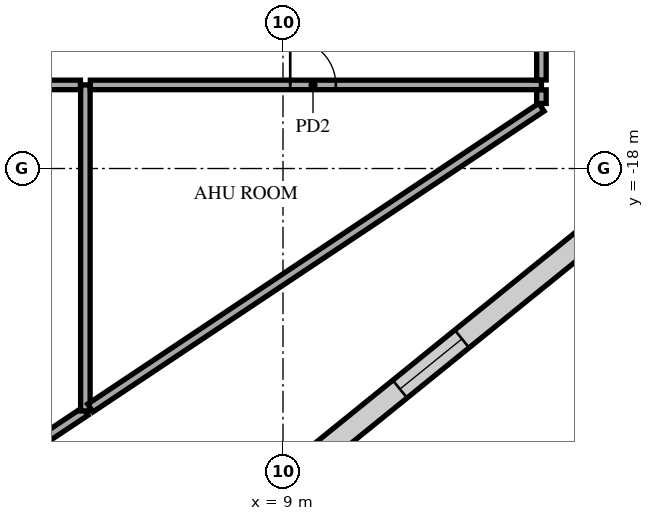
"""IFC4 building model, lengths in metres.
Left out: names, types, materials, properties, quantities, classifications, styles, units other than length and angle.
Written with IfcOpenShell. Run it as: python <this file> out.ifc"""

import sys

from ifc_helpers import new_model, si_unit, direction, frame, frame_2d, origin, place, context, subcontext, project, spatial, rectangle, extrude, element, fill, save


model = new_model("IFC4")
c1 = context("Model", 3, precision=1e-05, world=origin(), true_north=direction((0.0, 1.0)))
c2 = subcontext(c1, "Body", "Model", "MODEL_VIEW")
j1 = project(units=[si_unit("LENGTHUNIT", "METRE"), si_unit("PLANEANGLEUNIT", "RADIAN")], contexts=[c1])
p1 = place(None, origin())
s1 = spatial("IfcSite", under=j1, at=p1, CompositionType="ELEMENT")
p2 = place(p1, origin())
s2 = spatial("IfcBuilding", under=s1, at=p2, CompositionType="ELEMENT")
p3 = place(p2, frame((0.0, 0.0, 183.7)))
s3 = spatial("IfcBuildingStorey", under=s2, at=p3, CompositionType="ELEMENT", Elevation=183.7)
p4 = place(p3, frame((1.196, -26.125, 0.0), z_axis=(0.0, 0.0, 1.0), x_axis=(0.832014296467, 0.554754189236, 0.0)))
e1 = element("IfcWall", 1, at=p4, inside=s3, PredefinedType="PARTITIONING", context=c2, shape_type="SweptSolid", body=[
    extrude(rectangle(XDim=3.13, YDim=0.25, at=frame_2d((1.565, 0.0))), origin(), (0.0, 0.0, 1.0), 4.65),
])
p5 = place(p3, frame((3.8, -24.38, 0.0), z_axis=(0.0, 0.0, 1.0), x_axis=(0.0, 1.0, 0.0)))
e2 = element("IfcWall", 2, at=p5, inside=s3, PredefinedType="PARTITIONING", context=c2, shape_type="SweptSolid", body=[
    extrude(rectangle(XDim=8.58, YDim=0.25, at=frame_2d((4.29, 0.0))), origin(), (0.0, 0.0, 1.0), 5.22),
])
p6 = place(p3, frame((3.93, -24.302, 0.0), z_axis=(0.0, 0.0, 1.0), x_axis=(0.832021333185, 0.554743635497, 0.0)))
e3 = element("IfcWall", 3, at=p6, inside=s3, PredefinedType="PARTITIONING", context=c2, shape_type="SweptSolid", body=[
    extrude(rectangle(XDim=14.267, YDim=0.25, at=frame_2d((7.133, 0.0))), origin(), (0.0, 0.0, 1.0), 4.386),
])
p7 = place(p3, frame((-5.07, -15.8, 0.0), z_axis=(0.0, 0.0, 1.0), x_axis=(1.0, 0.0, 0.0)))
e4 = element("IfcWall", 4, at=p7, inside=s3, PredefinedType="PARTITIONING", context=c2, shape_type="SweptSolid", body=[
    extrude(rectangle(XDim=8.74, YDim=0.25, at=frame_2d((4.37, 0.0))), origin(), (0.0, 0.0, 1.0), 4.65),
])
p8 = place(p7, frame((3.77, 0.0, 0.0)))
e5 = element("IfcOpeningElement", 5, at=p8, cuts=e4, PredefinedType="OPENING", context=c2, shape_type="SweptSolid", body=[
    extrude(rectangle(XDim=1.2, YDim=2.1, at=frame_2d((0.6, 1.05))), frame((0.0, 0.135, 0.0), z_axis=(0.0, -1.0, 0.0), x_axis=(1.0, 0.0, 0.0)), (0.0, 0.0, 1.0), 0.27),
])
p9 = place(p3, frame((3.93, -15.8, 0.0), z_axis=(0.0, 0.0, 1.0), x_axis=(1.0, 0.0, 0.0)))
e6 = element("IfcWall", 6, at=p9, inside=s3, PredefinedType="PARTITIONING", context=c2, shape_type="SweptSolid", body=[
    extrude(rectangle(XDim=11.87, YDim=0.25, at=frame_2d((5.935, 0.0))), origin(), (0.0, 0.0, 1.0), 4.65),
])
p10 = place(p9, frame((5.26, 0.0, 0.0)))
e7 = element("IfcOpeningElement", 7, at=p10, cuts=e6, PredefinedType="OPENING", context=c2, shape_type="SweptSolid", body=[
    extrude(rectangle(XDim=1.2, YDim=2.1, at=frame_2d((0.6, 1.05))), frame((0.0, 0.135, 0.0), z_axis=(0.0, -1.0, 0.0), x_axis=(1.0, 0.0, 0.0)), (0.0, 0.0, 1.0), 0.27),
])
p11 = place(p3, frame((15.8, -16.289, 0.0), z_axis=(0.0, 0.0, 1.0), x_axis=(0.0, 1.0, 0.0)))
e8 = element("IfcWall", 8, at=p11, inside=s3, PredefinedType="PARTITIONING", context=c2, shape_type="SweptSolid", body=[
    extrude(rectangle(XDim=0.359, YDim=0.25, at=frame_2d((0.179, 0.0))), origin(), (0.0, 0.0, 1.0), 4.386),
])
p12 = place(p3, frame((15.8, -15.67, 0.0), z_axis=(0.0, 0.0, 1.0), x_axis=(0.0, 1.0, 0.0)))
e9 = element("IfcWall", 9, at=p12, inside=s3, PredefinedType="PARTITIONING", context=c2, shape_type="SweptSolid", body=[
    extrude(rectangle(XDim=1.97, YDim=0.25, at=frame_2d((0.985, 0.0))), origin(), (0.0, 0.0, 1.0), 4.65),
])
p13 = place(p3, frame((-2.907, -35.938, 0.0), z_axis=(0.0, 0.0, 1.0), x_axis=(0.777145668104, 0.629320753311, 0.0)))
e10 = element("IfcWall", 10, at=p13, inside=s3, PredefinedType="STANDARD", context=c2, shape_type="SweptSolid", body=[
    extrude(rectangle(XDim=49.751, YDim=0.6, at=frame_2d((24.876, 0.0))), origin(), (0.0, 0.0, 1.0), 5.22),
])
p14 = place(p13, frame((1.161, 0.0, 0.6)))
e11 = element("IfcOpeningElement", 11, at=p14, cuts=e10, PredefinedType="OPENING", context=c2, shape_type="SweptSolid", body=[
    extrude(rectangle(XDim=2.1, YDim=4.17, at=frame_2d((1.05, 2.085))), frame((0.0, 0.31, 0.0), z_axis=(0.0, -1.0, 0.0), x_axis=(1.0, 0.0, 0.0)), (0.0, 0.0, 1.0), 0.62),
])
p15 = place(p13, frame((5.644, 0.0, 0.6)))
e12 = element("IfcOpeningElement", 12, at=p15, cuts=e10, PredefinedType="OPENING", context=c2, shape_type="SweptSolid", body=[
    extrude(rectangle(XDim=2.1, YDim=4.17, at=frame_2d((1.05, 2.085))), frame((0.0, 0.31, 0.0), z_axis=(0.0, -1.0, 0.0), x_axis=(1.0, 0.0, 0.0)), (0.0, 0.0, 1.0), 0.62),
])
p16 = place(p13, frame((10.189, 0.0, 0.6)))
e13 = element("IfcOpeningElement", 13, at=p16, cuts=e10, PredefinedType="OPENING", context=c2, shape_type="SweptSolid", body=[
    extrude(rectangle(XDim=2.1, YDim=4.17, at=frame_2d((1.05, 2.085))), frame((0.0, 0.31, 0.0), z_axis=(0.0, -1.0, 0.0), x_axis=(1.0, 0.0, 0.0)), (0.0, 0.0, 1.0), 0.62),
])
p17 = place(p13, frame((19.28, 0.0, 0.6)))
e14 = element("IfcOpeningElement", 14, at=p17, cuts=e10, PredefinedType="OPENING", context=c2, shape_type="SweptSolid", body=[
    extrude(rectangle(XDim=2.1, YDim=4.17, at=frame_2d((1.05, 2.085))), frame((0.0, 0.31, 0.0), z_axis=(0.0, -1.0, 0.0), x_axis=(1.0, 0.0, 0.0)), (0.0, 0.0, 1.0), 0.62),
])
p18 = place(p13, frame((42.008, 0.0, 0.6)))
e15 = element("IfcOpeningElement", 15, at=p18, cuts=e10, PredefinedType="OPENING", context=c2, shape_type="SweptSolid", body=[
    extrude(rectangle(XDim=2.1, YDim=4.17, at=frame_2d((1.05, 2.085))), frame((0.0, 0.31, 0.0), z_axis=(0.0, -1.0, 0.0), x_axis=(1.0, 0.0, 0.0)), (0.0, 0.0, 1.0), 0.62),
])
p19 = place(p13, frame((46.491, 0.0, 0.6)))
e16 = element("IfcOpeningElement", 16, at=p19, cuts=e10, PredefinedType="OPENING", context=c2, shape_type="SweptSolid", body=[
    extrude(rectangle(XDim=2.1, YDim=4.17, at=frame_2d((1.05, 2.085))), frame((0.0, 0.31, 0.0), z_axis=(0.0, -1.0, 0.0), x_axis=(1.0, 0.0, 0.0)), (0.0, 0.0, 1.0), 0.62),
])
p20 = place(p10, origin())
e17 = element("IfcDoor", 17, at=p20, inside=s3, OperationType="SINGLE_SWING_LEFT", PredefinedType="DOOR", context=c2, shape_type="SweptSolid", body=[
    extrude(rectangle(XDim=1.2, YDim=2.1, at=frame_2d((0.6, 1.05))), frame((0.0, 0.025, 0.0), z_axis=(0.0, -1.0, 0.0), x_axis=(1.0, 0.0, 0.0)), (0.0, 0.0, 1.0), 0.05),
])
fill(e7, e17)
p21 = place(p17, origin())
e18 = element("IfcWindow", 18, at=p21, inside=s3, PartitioningType="SINGLE_PANEL", PredefinedType="USERDEFINED", context=c2, shape_type="SweptSolid", body=[
    extrude(rectangle(XDim=2.1, YDim=4.17, at=frame_2d((1.05, 2.085))), frame((0.0, 0.03, 0.0), z_axis=(0.0, -1.0, 0.0), x_axis=(1.0, 0.0, 0.0)), (0.0, 0.0, 1.0), 0.06),
])
fill(e14, e18)
save(model, sys.argv[1])
